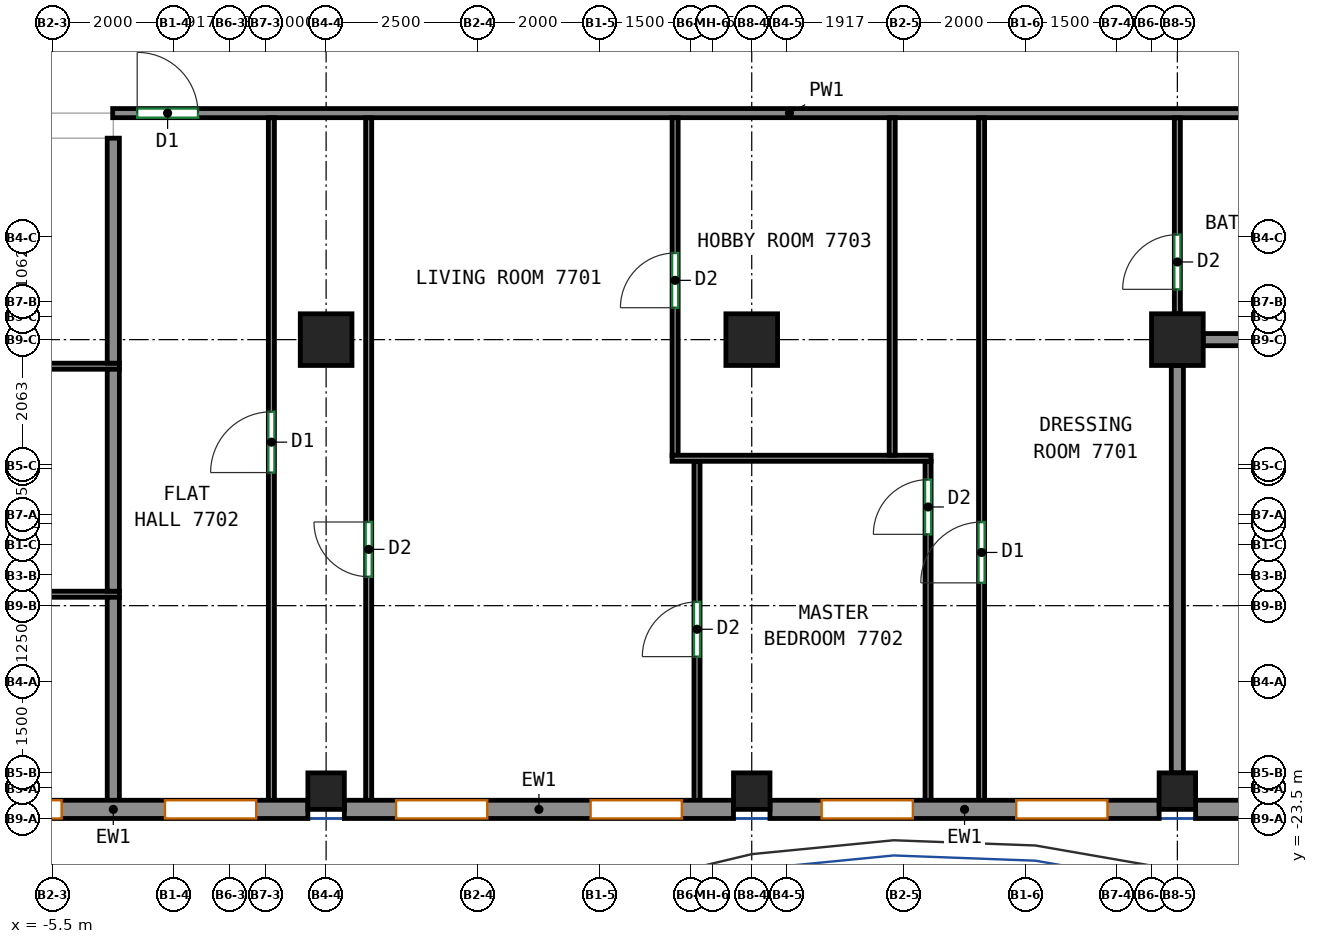
"""IFC4 building model, lengths in metres.
Left out: names, types, materials, properties, quantities, classifications, styles, units other than length and angle.
Written with IfcOpenShell. Run it as: python <this file> out.ifc"""

import sys

from ifc_helpers import new_model, si_unit, direction, frame, frame_2d, origin, origin_2d, place, context, subcontext, project, spatial, rectangle, extrude, source, transform, mapped, element, fill, save


model = new_model("IFC4")
c1 = context("Model", 3, precision=1e-05, world=origin(), true_north=direction((0.0, 1.0)))
c2 = subcontext(c1, "Body", "Model", "MODEL_VIEW")
j1 = project(units=[si_unit("LENGTHUNIT", "METRE"), si_unit("PLANEANGLEUNIT", "RADIAN")], contexts=[c1])
p1 = place(None, origin())
s1 = spatial("IfcSite", under=j1, at=p1, CompositionType="ELEMENT")
p2 = place(p1, origin())
s2 = spatial("IfcBuilding", under=s1, at=p2, CompositionType="ELEMENT")
p3 = place(p2, frame((0.0, 0.0, 308.6)))
s3 = spatial("IfcBuildingStorey", under=s2, at=p3, CompositionType="ELEMENT", Elevation=308.6)
m1 = source(origin(), c2, "Body", "SweptSolid", [
    extrude(rectangle(XDim=0.6, YDim=0.6, at=origin_2d()), origin(), (0.0, 0.0, 1.0), 3.12),
])
p4 = place(p3, frame((-1.0, -23.05, 0.0), z_axis=(0.0, 0.0, 1.0), x_axis=(1.0, 0.0, 0.0)))
e1 = element("IfcColumn", 1, at=p4, inside=s3, PredefinedType="COLUMN", context=c2, shape_type="MappedRepresentation", body=[
    mapped(m1, transform((0.0, 0.0, 0.0))),
])
m2 = source(origin(), c2, "Body", "SweptSolid", [
    extrude(rectangle(XDim=0.85, YDim=0.85, at=origin_2d()), origin(), (0.0, 0.0, 1.0), 3.12),
])
p5 = place(p3, frame((-1.0, -15.625, 0.0), z_axis=(0.0, 0.0, 1.0), x_axis=(1.0, 0.0, 0.0)))
e2 = element("IfcColumn", 2, at=p5, inside=s3, PredefinedType="COLUMN", context=c2, shape_type="MappedRepresentation", body=[
    mapped(m2, transform((0.0, 0.0, 0.0))),
])
p6 = place(p3, frame((6.0, -23.05, 0.0), z_axis=(0.0, 0.0, 1.0), x_axis=(1.0, 0.0, 0.0)))
e3 = element("IfcColumn", 3, at=p6, inside=s3, PredefinedType="COLUMN", context=c2, shape_type="MappedRepresentation", body=[
    mapped(m1, transform((0.0, 0.0, 0.0))),
])
p7 = place(p3, frame((6.0, -15.625, 0.0), z_axis=(0.0, 0.0, 1.0), x_axis=(1.0, 0.0, 0.0)))
e4 = element("IfcColumn", 4, at=p7, inside=s3, PredefinedType="COLUMN", context=c2, shape_type="MappedRepresentation", body=[
    mapped(m2, transform((0.0, 0.0, 0.0))),
])
p8 = place(p3, frame((13.0, -23.05, 0.0), z_axis=(0.0, 0.0, 1.0), x_axis=(1.0, 0.0, 0.0)))
e5 = element("IfcColumn", 5, at=p8, inside=s3, PredefinedType="COLUMN", context=c2, shape_type="MappedRepresentation", body=[
    mapped(m1, transform((0.0, 0.0, 0.0))),
])
p9 = place(p3, frame((13.0, -15.625, 0.0), z_axis=(0.0, 0.0, 1.0), x_axis=(1.0, 0.0, 0.0)))
e6 = element("IfcColumn", 6, at=p9, inside=s3, PredefinedType="COLUMN", context=c2, shape_type="MappedRepresentation", body=[
    mapped(m2, transform((0.0, 0.0, 0.0))),
])
m3 = source(origin(), c2, "Body", "SweptSolid", [
    extrude(rectangle(XDim=6.4, YDim=0.3, at=frame_2d((3.2, 0.0))), origin(), (0.0, 0.0, 1.0), 3.12),
])
p10 = place(p3, frame((-7.7, -23.35, 0.0), z_axis=(0.0, 0.0, 1.0), x_axis=(1.0, 0.0, 0.0)))
e7 = element("IfcWall", 7, at=p10, inside=s3, PredefinedType="SOLIDWALL", context=c2, shape_type="MappedRepresentation", body=[
    mapped(m3, transform((0.0, 0.0, 0.0))),
])
p11 = place(p10, frame((0.85, 0.0, 0.8)))
e8 = element("IfcOpeningElement", 8, at=p11, cuts=e7, PredefinedType="OPENING", context=c2, shape_type="SweptSolid", body=[
    extrude(rectangle(XDim=1.5, YDim=2.05, at=frame_2d((0.75, 1.025))), frame((0.0, 0.16, 0.0), z_axis=(0.0, -1.0, 0.0), x_axis=(1.0, 0.0, 0.0)), (0.0, 0.0, 1.0), 0.32),
])
p12 = place(p10, frame((4.05, 0.0, 0.8)))
e9 = element("IfcOpeningElement", 9, at=p12, cuts=e7, PredefinedType="OPENING", context=c2, shape_type="SweptSolid", body=[
    extrude(rectangle(XDim=1.5, YDim=2.05, at=frame_2d((0.75, 1.025))), frame((0.0, 0.16, 0.0), z_axis=(0.0, -1.0, 0.0), x_axis=(1.0, 0.0, 0.0)), (0.0, 0.0, 1.0), 0.32),
])
p13 = place(p3, frame((-0.7, -23.35, 0.0), z_axis=(0.0, 0.0, 1.0), x_axis=(1.0, 0.0, 0.0)))
e10 = element("IfcWall", 10, at=p13, inside=s3, PredefinedType="SOLIDWALL", context=c2, shape_type="MappedRepresentation", body=[
    mapped(m3, transform((0.0, 0.0, 0.0))),
])
p14 = place(p13, frame((0.85, 0.0, 0.8)))
e11 = element("IfcOpeningElement", 11, at=p14, cuts=e10, PredefinedType="OPENING", context=c2, shape_type="SweptSolid", body=[
    extrude(rectangle(XDim=1.5, YDim=2.05, at=frame_2d((0.75, 1.025))), frame((0.0, 0.16, 0.0), z_axis=(0.0, -1.0, 0.0), x_axis=(1.0, 0.0, 0.0)), (0.0, 0.0, 1.0), 0.32),
])
p15 = place(p13, frame((4.05, 0.0, 0.8)))
e12 = element("IfcOpeningElement", 12, at=p15, cuts=e10, PredefinedType="OPENING", context=c2, shape_type="SweptSolid", body=[
    extrude(rectangle(XDim=1.5, YDim=2.05, at=frame_2d((0.75, 1.025))), frame((0.0, 0.16, 0.0), z_axis=(0.0, -1.0, 0.0), x_axis=(1.0, 0.0, 0.0)), (0.0, 0.0, 1.0), 0.32),
])
p16 = place(p3, frame((6.3, -23.35, 0.0), z_axis=(0.0, 0.0, 1.0), x_axis=(1.0, 0.0, 0.0)))
e13 = element("IfcWall", 13, at=p16, inside=s3, PredefinedType="SOLIDWALL", context=c2, shape_type="MappedRepresentation", body=[
    mapped(m3, transform((0.0, 0.0, 0.0))),
])
p17 = place(p16, frame((0.85, 0.0, 0.8)))
e14 = element("IfcOpeningElement", 14, at=p17, cuts=e13, PredefinedType="OPENING", context=c2, shape_type="SweptSolid", body=[
    extrude(rectangle(XDim=1.5, YDim=2.05, at=frame_2d((0.75, 1.025))), frame((0.0, 0.16, 0.0), z_axis=(0.0, -1.0, 0.0), x_axis=(1.0, 0.0, 0.0)), (0.0, 0.0, 1.0), 0.32),
])
p18 = place(p16, frame((4.05, 0.0, 0.8)))
e15 = element("IfcOpeningElement", 15, at=p18, cuts=e13, PredefinedType="OPENING", context=c2, shape_type="SweptSolid", body=[
    extrude(rectangle(XDim=1.5, YDim=2.05, at=frame_2d((0.75, 1.025))), frame((0.0, 0.16, 0.0), z_axis=(0.0, -1.0, 0.0), x_axis=(1.0, 0.0, 0.0)), (0.0, 0.0, 1.0), 0.32),
])
p19 = place(p3, frame((13.3, -23.35, 0.0), z_axis=(0.0, 0.0, 1.0), x_axis=(1.0, 0.0, 0.0)))
e16 = element("IfcWall", 16, at=p19, inside=s3, PredefinedType="SOLIDWALL", context=c2, shape_type="MappedRepresentation", body=[
    mapped(m3, transform((0.0, 0.0, 0.0))),
])
p20 = place(p19, frame((0.85, 0.0, 0.8)))
e17 = element("IfcOpeningElement", 17, at=p20, cuts=e16, PredefinedType="OPENING", context=c2, shape_type="SweptSolid", body=[
    extrude(rectangle(XDim=1.5, YDim=2.05, at=frame_2d((0.75, 1.025))), frame((0.0, 0.16, 0.0), z_axis=(0.0, -1.0, 0.0), x_axis=(1.0, 0.0, 0.0)), (0.0, 0.0, 1.0), 0.32),
])
p21 = place(p19, frame((4.05, 0.0, 0.8)))
e18 = element("IfcOpeningElement", 18, at=p21, cuts=e16, PredefinedType="OPENING", context=c2, shape_type="SweptSolid", body=[
    extrude(rectangle(XDim=1.5, YDim=2.05, at=frame_2d((0.75, 1.025))), frame((0.0, 0.16, 0.0), z_axis=(0.0, -1.0, 0.0), x_axis=(1.0, 0.0, 0.0)), (0.0, 0.0, 1.0), 0.32),
])
p22 = place(p3, frame((-4.51, -11.9, 0.0), z_axis=(0.0, 0.0, 1.0), x_axis=(1.0, 0.0, 0.0)))
e19 = element("IfcWall", 19, at=p22, inside=s3, PredefinedType="PARTITIONING", context=c2, shape_type="SweptSolid", body=[
    extrude(rectangle(XDim=22.26, YDim=0.15, at=frame_2d((11.13, 0.0))), origin(), (0.0, 0.0, 1.0), 3.12),
])
p23 = place(p22, frame((0.403, 0.0, 0.0)))
e20 = element("IfcOpeningElement", 20, at=p23, cuts=e19, PredefinedType="OPENING", context=c2, shape_type="SweptSolid", body=[
    extrude(rectangle(XDim=1.0, YDim=2.1, at=frame_2d((0.5, 1.05))), frame((0.0, 0.085, 0.0), z_axis=(0.0, -1.0, 0.0), x_axis=(1.0, 0.0, 0.0)), (0.0, 0.0, 1.0), 0.17),
])
p24 = place(p3, frame((-24.75, -19.812, 0.0), z_axis=(0.0, 0.0, 1.0), x_axis=(1.0, 0.0, 0.0)))
e21 = element("IfcWall", 21, at=p24, inside=s3, PredefinedType="PARTITIONING", context=c2, shape_type="SweptSolid", body=[
    extrude(rectangle(XDim=20.35, YDim=0.1, at=frame_2d((10.175, 0.0))), origin(), (0.0, 0.0, 1.0), 3.12),
])
p25 = place(p24, frame((2.624, 0.0, 0.0)))
e22 = element("IfcOpeningElement", 22, at=p25, cuts=e21, PredefinedType="OPENING", context=c2, shape_type="SweptSolid", body=[
    extrude(rectangle(XDim=0.9, YDim=2.1, at=frame_2d((0.45, 1.05))), frame((0.0, 0.06, 0.0), z_axis=(0.0, -1.0, 0.0), x_axis=(1.0, 0.0, 0.0)), (0.0, 0.0, 1.0), 0.12),
])
p26 = place(p3, frame((-4.5, -23.25, 0.0), z_axis=(0.0, 0.0, 1.0), x_axis=(0.0, 1.0, 0.0)))
e23 = element("IfcWall", 23, at=p26, inside=s3, PredefinedType="PARTITIONING", context=c2, shape_type="SweptSolid", body=[
    extrude(rectangle(XDim=3.388, YDim=0.2, at=frame_2d((1.694, 0.0))), origin(), (0.0, 0.0, 1.0), 3.12),
])
p27 = place(p3, frame((-7.575, -16.062, 0.0), z_axis=(0.0, 0.0, 1.0), x_axis=(1.0, 0.0, 0.0)))
e24 = element("IfcWall", 24, at=p27, inside=s3, PredefinedType="PARTITIONING", context=c2, shape_type="SweptSolid", body=[
    extrude(rectangle(XDim=3.175, YDim=0.1, at=frame_2d((1.587, 0.0))), origin(), (0.0, 0.0, 1.0), 3.12),
])
p28 = place(p3, frame((-4.5, -19.762, 0.0), z_axis=(0.0, 0.0, 1.0), x_axis=(0.0, 1.0, 0.0)))
e25 = element("IfcWall", 25, at=p28, inside=s3, PredefinedType="PARTITIONING", context=c2, shape_type="SweptSolid", body=[
    extrude(rectangle(XDim=3.65, YDim=0.2, at=frame_2d((1.825, 0.0))), origin(), (0.0, 0.0, 1.0), 3.12),
])
p29 = place(p3, frame((-4.5, -16.012, 0.0), z_axis=(0.0, 0.0, 1.0), x_axis=(0.0, 1.0, 0.0)))
e26 = element("IfcWall", 26, at=p29, inside=s3, PredefinedType="PARTITIONING", context=c2, shape_type="SweptSolid", body=[
    extrude(rectangle(XDim=3.7, YDim=0.2, at=frame_2d((1.85, 0.0))), origin(), (0.0, 0.0, 1.0), 3.12),
])
p30 = place(p3, frame((-1.9, -23.25, 0.0), z_axis=(0.0, 0.0, 1.0), x_axis=(0.0, 1.0, 0.0)))
e27 = element("IfcWall", 27, at=p30, inside=s3, PredefinedType="PARTITIONING", context=c2, shape_type="SweptSolid", body=[
    extrude(rectangle(XDim=11.273, YDim=0.1, at=frame_2d((5.636, 0.0))), origin(), (0.0, 0.0, 1.0), 3.12),
])
p31 = place(p30, frame((5.439, 0.0, 0.0)))
e28 = element("IfcOpeningElement", 28, at=p31, cuts=e27, PredefinedType="OPENING", context=c2, shape_type="SweptSolid", body=[
    extrude(rectangle(XDim=1.0, YDim=2.1, at=frame_2d((0.5, 1.05))), frame((0.0, 0.06, 0.0), z_axis=(0.0, -1.0, 0.0), x_axis=(1.0, 0.0, 0.0)), (0.0, 0.0, 1.0), 0.12),
])
p32 = place(p3, frame((-0.3, -23.25, 0.0), z_axis=(0.0, 0.0, 1.0), x_axis=(0.0, 1.0, 0.0)))
e29 = element("IfcWall", 29, at=p32, inside=s3, PredefinedType="PARTITIONING", context=c2, shape_type="SweptSolid", body=[
    extrude(rectangle(XDim=11.273, YDim=0.1, at=frame_2d((5.636, 0.0))), origin(), (0.0, 0.0, 1.0), 3.12),
])
p33 = place(p32, frame((3.726, 0.0, 0.0)))
e30 = element("IfcOpeningElement", 30, at=p33, cuts=e29, PredefinedType="OPENING", context=c2, shape_type="SweptSolid", body=[
    extrude(rectangle(XDim=0.9, YDim=2.1, at=frame_2d((0.45, 1.05))), frame((0.0, 0.06, 0.0), z_axis=(0.0, -1.0, 0.0), x_axis=(1.0, 0.0, 0.0)), (0.0, 0.0, 1.0), 0.12),
])
p34 = place(p3, frame((5.1, -23.25, 0.0), z_axis=(0.0, 0.0, 1.0), x_axis=(0.0, 1.0, 0.0)))
e31 = element("IfcWall", 31, at=p34, inside=s3, PredefinedType="PARTITIONING", context=c2, shape_type="SweptSolid", body=[
    extrude(rectangle(XDim=5.624, YDim=0.1, at=frame_2d((2.812, 0.0))), origin(), (0.0, 0.0, 1.0), 3.12),
])
p35 = place(p34, frame((2.412, 0.0, 0.0)))
e32 = element("IfcOpeningElement", 32, at=p35, cuts=e31, PredefinedType="OPENING", context=c2, shape_type="SweptSolid", body=[
    extrude(rectangle(XDim=0.9, YDim=2.1, at=frame_2d((0.45, 1.05))), frame((0.0, 0.06, 0.0), z_axis=(0.0, -1.0, 0.0), x_axis=(1.0, 0.0, 0.0)), (0.0, 0.0, 1.0), 0.12),
])
p36 = place(p3, frame((4.74, -17.526, 0.0), z_axis=(0.0, 0.0, 1.0), x_axis=(0.0, 1.0, 0.0)))
e33 = element("IfcWall", 33, at=p36, inside=s3, PredefinedType="PARTITIONING", context=c2, shape_type="SweptSolid", body=[
    extrude(rectangle(XDim=5.549, YDim=0.1, at=frame_2d((2.774, 0.0))), origin(), (0.0, 0.0, 1.0), 3.12),
])
p37 = place(p36, frame((2.426, 0.0, 0.0)))
e34 = element("IfcOpeningElement", 34, at=p37, cuts=e33, PredefinedType="OPENING", context=c2, shape_type="SweptSolid", body=[
    extrude(rectangle(XDim=0.9, YDim=2.1, at=frame_2d((0.45, 1.05))), frame((0.0, 0.06, 0.0), z_axis=(0.0, -1.0, 0.0), x_axis=(1.0, 0.0, 0.0)), (0.0, 0.0, 1.0), 0.12),
])
p38 = place(p3, frame((4.69, -17.576, 0.0), z_axis=(0.0, 0.0, 1.0), x_axis=(1.0, 0.0, 0.0)))
e35 = element("IfcWall", 35, at=p38, inside=s3, PredefinedType="PARTITIONING", context=c2, shape_type="SweptSolid", body=[
    extrude(rectangle(XDim=4.26, YDim=0.1, at=frame_2d((2.13, 0.0))), origin(), (0.0, 0.0, 1.0), 3.12),
])
p39 = place(p3, frame((8.9, -23.25, 0.0), z_axis=(0.0, 0.0, 1.0), x_axis=(0.0, 1.0, 0.0)))
e36 = element("IfcWall", 36, at=p39, inside=s3, PredefinedType="PARTITIONING", context=c2, shape_type="SweptSolid", body=[
    extrude(rectangle(XDim=5.624, YDim=0.1, at=frame_2d((2.812, 0.0))), origin(), (0.0, 0.0, 1.0), 3.12),
])
p40 = place(p39, frame((4.423, 0.0, 0.0)))
e37 = element("IfcOpeningElement", 37, at=p40, cuts=e36, PredefinedType="OPENING", context=c2, shape_type="SweptSolid", body=[
    extrude(rectangle(XDim=0.9, YDim=2.1, at=frame_2d((0.45, 1.05))), frame((0.0, 0.06, 0.0), z_axis=(0.0, -1.0, 0.0), x_axis=(1.0, 0.0, 0.0)), (0.0, 0.0, 1.0), 0.12),
])
p41 = place(p3, frame((8.31, -17.526, 0.0), z_axis=(0.0, 0.0, 1.0), x_axis=(0.0, 1.0, 0.0)))
e38 = element("IfcWall", 38, at=p41, inside=s3, PredefinedType="PARTITIONING", context=c2, shape_type="SweptSolid", body=[
    extrude(rectangle(XDim=5.549, YDim=0.1, at=frame_2d((2.774, 0.0))), origin(), (0.0, 0.0, 1.0), 3.12),
])
p42 = place(p3, frame((9.78, -23.25, 0.0), z_axis=(0.0, 0.0, 1.0), x_axis=(0.0, 1.0, 0.0)))
e39 = element("IfcWall", 39, at=p42, inside=s3, PredefinedType="PARTITIONING", context=c2, shape_type="SweptSolid", body=[
    extrude(rectangle(XDim=11.273, YDim=0.1, at=frame_2d((5.636, 0.0))), origin(), (0.0, 0.0, 1.0), 3.12),
])
p43 = place(p42, frame((3.625, 0.0, 0.0)))
e40 = element("IfcOpeningElement", 40, at=p43, cuts=e39, PredefinedType="OPENING", context=c2, shape_type="SweptSolid", body=[
    extrude(rectangle(XDim=1.0, YDim=2.1, at=frame_2d((0.5, 1.05))), frame((0.0, 0.06, 0.0), z_axis=(0.0, -1.0, 0.0), x_axis=(1.0, 0.0, 0.0)), (0.0, 0.0, 1.0), 0.12),
])
p44 = place(p3, frame((13.0, -15.2, 0.0), z_axis=(0.0, 0.0, 1.0), x_axis=(0.0, 1.0, 0.0)))
e41 = element("IfcWall", 41, at=p44, inside=s3, PredefinedType="PARTITIONING", context=c2, shape_type="SweptSolid", body=[
    extrude(rectangle(XDim=3.223, YDim=0.1, at=frame_2d((1.611, 0.0))), origin(), (0.0, 0.0, 1.0), 3.12),
])
p45 = place(p44, frame((0.402, 0.0, 0.0)))
e42 = element("IfcOpeningElement", 42, at=p45, cuts=e41, PredefinedType="OPENING", context=c2, shape_type="SweptSolid", body=[
    extrude(rectangle(XDim=0.9, YDim=2.1, at=frame_2d((0.45, 1.05))), frame((0.0, 0.06, 0.0), z_axis=(0.0, -1.0, 0.0), x_axis=(1.0, 0.0, 0.0)), (0.0, 0.0, 1.0), 0.12),
])
p46 = place(p3, frame((13.0, -22.75, 0.0), z_axis=(0.0, 0.0, 1.0), x_axis=(0.0, 1.0, 0.0)))
e43 = element("IfcWall", 43, at=p46, inside=s3, PredefinedType="PARTITIONING", context=c2, shape_type="SweptSolid", body=[
    extrude(rectangle(XDim=6.7, YDim=0.2, at=frame_2d((3.35, 0.0))), origin(), (0.0, 0.0, 1.0), 3.12),
])
p47 = place(p3, frame((13.425, -15.625, 0.0), z_axis=(0.0, 0.0, 1.0), x_axis=(1.0, 0.0, 0.0)))
e44 = element("IfcWall", 44, at=p47, inside=s3, PredefinedType="PARTITIONING", context=c2, shape_type="SweptSolid", body=[
    extrude(rectangle(XDim=3.175, YDim=0.2, at=frame_2d((1.587, 0.0))), origin(), (0.0, 0.0, 1.0), 3.12),
])
p48 = place(p11, origin())
e45 = element("IfcWindow", 45, at=p48, inside=s3, PartitioningType="SINGLE_PANEL", PredefinedType="WINDOW", context=c2, shape_type="SweptSolid", body=[
    extrude(rectangle(XDim=1.5, YDim=2.05, at=frame_2d((0.75, 1.025))), frame((0.0, 0.03, 0.0), z_axis=(0.0, -1.0, 0.0), x_axis=(1.0, 0.0, 0.0)), (0.0, 0.0, 1.0), 0.06),
])
fill(e8, e45)
p49 = place(p12, origin())
e46 = element("IfcWindow", 46, at=p49, inside=s3, PartitioningType="SINGLE_PANEL", PredefinedType="WINDOW", context=c2, shape_type="SweptSolid", body=[
    extrude(rectangle(XDim=1.5, YDim=2.05, at=frame_2d((0.75, 1.025))), frame((0.0, 0.03, 0.0), z_axis=(0.0, -1.0, 0.0), x_axis=(1.0, 0.0, 0.0)), (0.0, 0.0, 1.0), 0.06),
])
fill(e9, e46)
p50 = place(p14, origin())
e47 = element("IfcWindow", 47, at=p50, inside=s3, PartitioningType="SINGLE_PANEL", PredefinedType="WINDOW", context=c2, shape_type="SweptSolid", body=[
    extrude(rectangle(XDim=1.5, YDim=2.05, at=frame_2d((0.75, 1.025))), frame((0.0, 0.03, 0.0), z_axis=(0.0, -1.0, 0.0), x_axis=(1.0, 0.0, 0.0)), (0.0, 0.0, 1.0), 0.06),
])
fill(e11, e47)
p51 = place(p15, origin())
e48 = element("IfcWindow", 48, at=p51, inside=s3, PartitioningType="SINGLE_PANEL", PredefinedType="WINDOW", context=c2, shape_type="SweptSolid", body=[
    extrude(rectangle(XDim=1.5, YDim=2.05, at=frame_2d((0.75, 1.025))), frame((0.0, 0.03, 0.0), z_axis=(0.0, -1.0, 0.0), x_axis=(1.0, 0.0, 0.0)), (0.0, 0.0, 1.0), 0.06),
])
fill(e12, e48)
p52 = place(p17, origin())
e49 = element("IfcWindow", 49, at=p52, inside=s3, PartitioningType="SINGLE_PANEL", PredefinedType="WINDOW", context=c2, shape_type="SweptSolid", body=[
    extrude(rectangle(XDim=1.5, YDim=2.05, at=frame_2d((0.75, 1.025))), frame((0.0, 0.03, 0.0), z_axis=(0.0, -1.0, 0.0), x_axis=(1.0, 0.0, 0.0)), (0.0, 0.0, 1.0), 0.06),
])
fill(e14, e49)
p53 = place(p18, origin())
e50 = element("IfcWindow", 50, at=p53, inside=s3, PartitioningType="SINGLE_PANEL", PredefinedType="WINDOW", context=c2, shape_type="SweptSolid", body=[
    extrude(rectangle(XDim=1.5, YDim=2.05, at=frame_2d((0.75, 1.025))), frame((0.0, 0.03, 0.0), z_axis=(0.0, -1.0, 0.0), x_axis=(1.0, 0.0, 0.0)), (0.0, 0.0, 1.0), 0.06),
])
fill(e15, e50)
p54 = place(p35, origin())
e51 = element("IfcDoor", 51, at=p54, inside=s3, OperationType="SINGLE_SWING_LEFT", PredefinedType="DOOR", context=c2, shape_type="SweptSolid", body=[
    extrude(rectangle(XDim=0.9, YDim=2.1, at=frame_2d((0.45, 1.05))), frame((0.0, 0.025, 0.0), z_axis=(0.0, -1.0, 0.0), x_axis=(1.0, 0.0, 0.0)), (0.0, 0.0, 1.0), 0.05),
])
fill(e32, e51)
p55 = place(p43, origin())
e52 = element("IfcDoor", 52, at=p55, inside=s3, OperationType="SINGLE_SWING_LEFT", PredefinedType="DOOR", context=c2, shape_type="SweptSolid", body=[
    extrude(rectangle(XDim=1.0, YDim=2.1, at=frame_2d((0.5, 1.05))), frame((0.0, 0.025, 0.0), z_axis=(0.0, -1.0, 0.0), x_axis=(1.0, 0.0, 0.0)), (0.0, 0.0, 1.0), 0.05),
])
fill(e40, e52)
p56 = place(p33, origin())
e53 = element("IfcDoor", 53, at=p56, inside=s3, OperationType="SINGLE_SWING_RIGHT", PredefinedType="DOOR", context=c2, shape_type="SweptSolid", body=[
    extrude(rectangle(XDim=0.9, YDim=2.1, at=frame_2d((0.45, 1.05))), frame((0.0, 0.025, 0.0), z_axis=(0.0, -1.0, 0.0), x_axis=(1.0, 0.0, 0.0)), (0.0, 0.0, 1.0), 0.05),
])
fill(e30, e53)
p57 = place(p40, origin())
e54 = element("IfcDoor", 54, at=p57, inside=s3, OperationType="SINGLE_SWING_LEFT", PredefinedType="DOOR", context=c2, shape_type="SweptSolid", body=[
    extrude(rectangle(XDim=0.9, YDim=2.1, at=frame_2d((0.45, 1.05))), frame((0.0, 0.025, 0.0), z_axis=(0.0, -1.0, 0.0), x_axis=(1.0, 0.0, 0.0)), (0.0, 0.0, 1.0), 0.05),
])
fill(e37, e54)
p58 = place(p31, origin())
e55 = element("IfcDoor", 55, at=p58, inside=s3, OperationType="SINGLE_SWING_LEFT", PredefinedType="DOOR", context=c2, shape_type="SweptSolid", body=[
    extrude(rectangle(XDim=1.0, YDim=2.1, at=frame_2d((0.5, 1.05))), frame((0.0, 0.025, 0.0), z_axis=(0.0, -1.0, 0.0), x_axis=(1.0, 0.0, 0.0)), (0.0, 0.0, 1.0), 0.05),
])
fill(e28, e55)
p59 = place(p37, origin())
e56 = element("IfcDoor", 56, at=p59, inside=s3, OperationType="SINGLE_SWING_LEFT", PredefinedType="DOOR", context=c2, shape_type="SweptSolid", body=[
    extrude(rectangle(XDim=0.9, YDim=2.1, at=frame_2d((0.45, 1.05))), frame((0.0, 0.025, 0.0), z_axis=(0.0, -1.0, 0.0), x_axis=(1.0, 0.0, 0.0)), (0.0, 0.0, 1.0), 0.05),
])
fill(e34, e56)
p60 = place(p45, origin())
e57 = element("IfcDoor", 57, at=p60, inside=s3, OperationType="SINGLE_SWING_LEFT", PredefinedType="DOOR", context=c2, shape_type="SweptSolid", body=[
    extrude(rectangle(XDim=0.9, YDim=2.1, at=frame_2d((0.45, 1.05))), frame((0.0, 0.025, 0.0), z_axis=(0.0, -1.0, 0.0), x_axis=(1.0, 0.0, 0.0)), (0.0, 0.0, 1.0), 0.05),
])
fill(e42, e57)
p61 = place(p23, origin())
e58 = element("IfcDoor", 58, at=p61, inside=s3, OperationType="SINGLE_SWING_LEFT", PredefinedType="DOOR", context=c2, shape_type="SweptSolid", body=[
    extrude(rectangle(XDim=1.0, YDim=2.1, at=frame_2d((0.5, 1.05))), frame((0.0, 0.025, 0.0), z_axis=(0.0, -1.0, 0.0), x_axis=(1.0, 0.0, 0.0)), (0.0, 0.0, 1.0), 0.05),
])
fill(e20, e58)
save(model, sys.argv[1])
